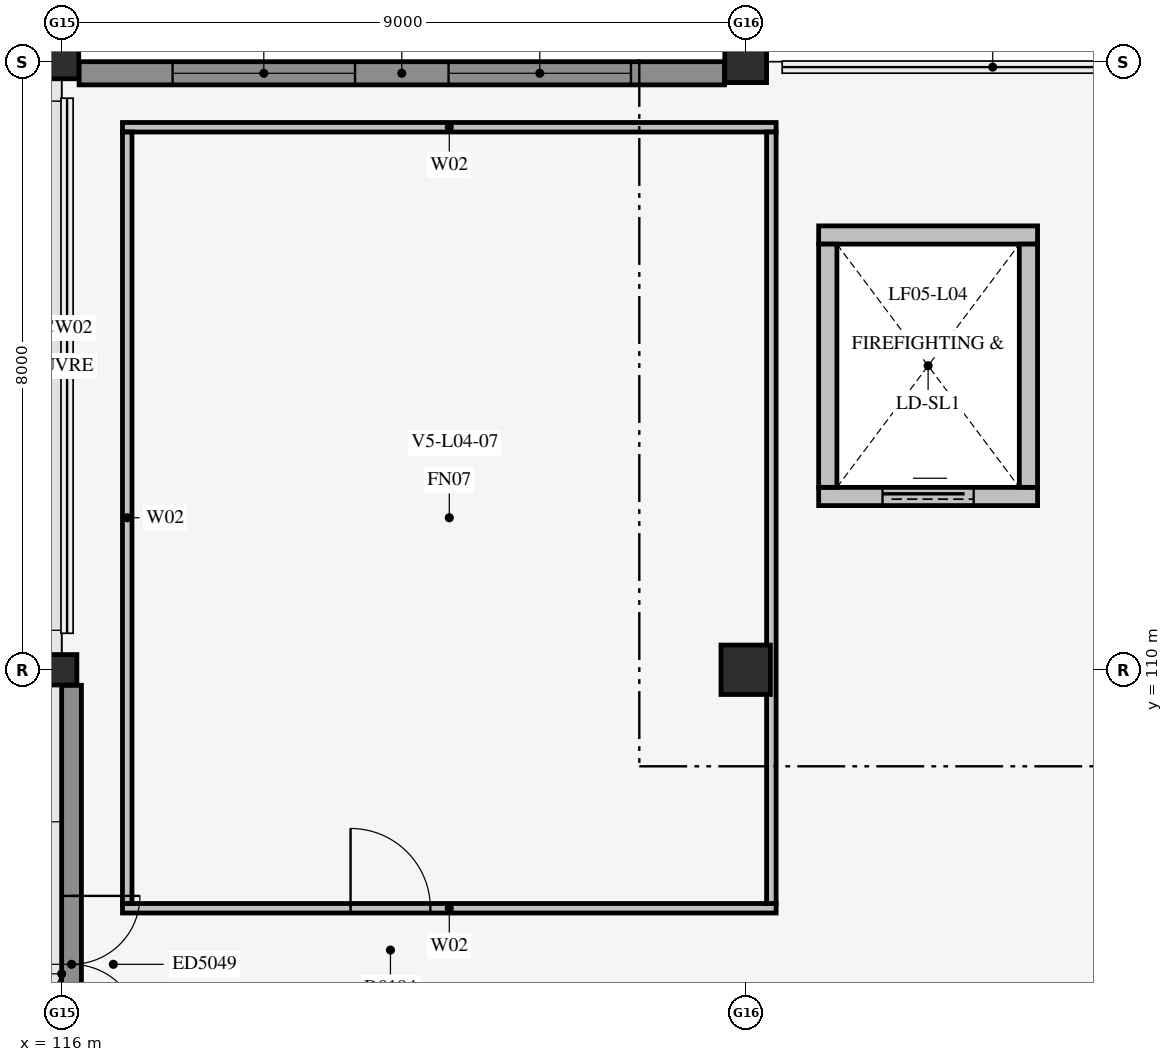
"""IFC4 building model, lengths in metres.
Left out: names, types, materials, properties, quantities, classifications, styles, units other than length and angle.
Written with IfcOpenShell. Run it as: python <this file> out.ifc"""

import sys

from ifc_helpers import new_model, si_unit, direction, frame, frame_2d, origin, origin_2d, place, context, subcontext, project, spatial, rectangle, extrude, element, fill, save


model = new_model("IFC4")
c1 = context("Model", 3, precision=1e-05, world=origin(), true_north=direction((0.0, 1.0)))
c2 = subcontext(c1, "Body", "Model", "MODEL_VIEW")
j1 = project(units=[si_unit("LENGTHUNIT", "METRE"), si_unit("PLANEANGLEUNIT", "RADIAN")], contexts=[c1])
p1 = place(None, origin())
s1 = spatial("IfcSite", under=j1, at=p1, CompositionType="ELEMENT")
p2 = place(p1, origin())
s2 = spatial("IfcBuilding", under=s1, at=p2, CompositionType="ELEMENT")
p3 = place(p2, frame((0.0, 0.0, 19.0)))
s3 = spatial("IfcBuildingStorey", under=s2, at=p3, CompositionType="ELEMENT", Elevation=19.0)
p4 = place(p3, frame((125.96, 112.28, 0.0), z_axis=(0.0, 0.0, 1.0), x_axis=(1.0, 0.0, 0.0)))
e1 = element("IfcWall", 1, at=p4, inside=s3, PredefinedType="SOLIDWALL", context=c2, shape_type="SweptSolid", body=[
    extrude(rectangle(XDim=2.88, YDim=0.24, at=frame_2d((1.44, 0.0))), origin(), (0.0, 0.0, 1.0), 3.45),
])
p5 = place(p4, frame((0.84, 0.0, 0.0)))
e2 = element("IfcOpeningElement", 2, at=p5, cuts=e1, PredefinedType="OPENING", context=c2, shape_type="SweptSolid", body=[
    extrude(rectangle(XDim=1.2, YDim=2.2, at=frame_2d((0.6, 1.1))), frame((0.0, 0.132, 0.0), z_axis=(0.0, -1.0, 0.0), x_axis=(1.0, 0.0, 0.0)), (0.0, 0.0, 1.0), 0.264),
])
p6 = place(p3, frame((125.96, 115.72, 0.0), z_axis=(0.0, 0.0, 1.0), x_axis=(1.0, 0.0, 0.0)))
e3 = element("IfcWall", 3, at=p6, inside=s3, PredefinedType="SOLIDWALL", context=c2, shape_type="SweptSolid", body=[
    extrude(rectangle(XDim=2.88, YDim=0.24, at=frame_2d((1.44, 0.0))), origin(), (0.0, 0.0, 1.0), 3.45),
])
for number, where, z_axis, x_axis in (
    (4, (126.08, 112.4, 0.0), (0.0, 0.0, 1.0), (0.0, 1.0, 0.0)),
    (5, (128.72, 112.4, 0.0), (0.0, 0.0, 1.0), (0.0, 1.0, 0.0)),
):
    element("IfcWall", number, at=place(p3, frame(where, z_axis=z_axis, x_axis=x_axis)), inside=s3, PredefinedType="SOLIDWALL", context=c2, shape_type="SweptSolid", body=[
        extrude(rectangle(XDim=3.2, YDim=0.24, at=frame_2d((1.6, 0.0))), origin(), (0.0, 0.0, 1.0), 3.45),
    ])
p7 = place(p3, frame((116.0, 110.0, 0.0), z_axis=(0.0, 0.0, 1.0), x_axis=(1.0, 0.0, 0.0)))
e6 = element("IfcColumn", 6, at=p7, inside=s3, PredefinedType="COLUMN", context=c2, shape_type="SweptSolid", body=[
    extrude(rectangle(XDim=0.4, YDim=0.4, at=origin_2d()), origin(), (0.0, 0.0, 1.0), 3.85),
])
p8 = place(p3, frame((116.0, 118.0, 0.0), z_axis=(0.0, 0.0, 1.0), x_axis=(1.0, 0.0, 0.0)))
e7 = element("IfcColumn", 7, at=p8, inside=s3, PredefinedType="COLUMN", context=c2, shape_type="SweptSolid", body=[
    extrude(rectangle(XDim=0.45, YDim=0.45, at=origin_2d()), origin(), (0.0, 0.0, 1.0), 3.85),
])
p9 = place(p3, frame((125.0, 110.0, 0.0), z_axis=(0.0, 0.0, 1.0), x_axis=(1.0, 0.0, 0.0)))
e8 = element("IfcColumn", 8, at=p9, inside=s3, PredefinedType="COLUMN", context=c2, shape_type="SweptSolid", body=[
    extrude(rectangle(XDim=0.65, YDim=0.65, at=origin_2d()), origin(), (0.0, 0.0, 1.0), 3.85),
])
p10 = place(p3, frame((125.0, 118.0, 0.0), z_axis=(0.0, 0.0, 1.0), x_axis=(1.0, 0.0, 0.0)))
e9 = element("IfcColumn", 9, at=p10, inside=s3, PredefinedType="COLUMN", context=c2, shape_type="SweptSolid", body=[
    extrude(rectangle(XDim=0.55, YDim=0.55, at=origin_2d()), origin(), (0.0, 0.0, 1.0), 3.85),
])
p11 = place(p3, frame((116.8, 106.863, 0.0), z_axis=(0.0, 0.0, 1.0), x_axis=(1.0, 0.0, 0.0)))
e10 = element("IfcWall", 10, at=p11, inside=s3, PredefinedType="PARTITIONING", context=c2, shape_type="SweptSolid", body=[
    extrude(rectangle(XDim=8.6, YDim=0.125, at=frame_2d((4.3, 0.0))), origin(), (0.0, 0.0, 1.0), 3.835),
])
p12 = place(p11, frame((3.001, 0.0, 0.0)))
e11 = element("IfcOpeningElement", 11, at=p12, cuts=e10, PredefinedType="OPENING", context=c2, shape_type="SweptSolid", body=[
    extrude(rectangle(XDim=1.05, YDim=2.15, at=frame_2d((0.525, 1.075))), frame((0.0, 0.074, 0.0), z_axis=(0.0, -1.0, 0.0), x_axis=(1.0, 0.0, 0.0)), (0.0, 0.0, 1.0), 0.149),
])
p13 = place(p3, frame((116.8, 117.137, 0.0), z_axis=(0.0, 0.0, 1.0), x_axis=(1.0, 0.0, 0.0)))
e12 = element("IfcWall", 12, at=p13, inside=s3, PredefinedType="PARTITIONING", context=c2, shape_type="SweptSolid", body=[
    extrude(rectangle(XDim=8.6, YDim=0.125, at=frame_2d((4.3, 0.0))), origin(), (0.0, 0.0, 1.0), 3.835),
])
for number, where, z_axis, x_axis in (
    (13, (125.337, 106.925, 0.0), (0.0, 0.0, 1.0), (0.0, 1.0, 0.0)),
    (14, (116.863, 106.925, 0.0), (0.0, 0.0, 1.0), (0.0, 1.0, 0.0)),
):
    element("IfcWall", number, at=place(p3, frame(where, z_axis=z_axis, x_axis=x_axis)), inside=s3, PredefinedType="PARTITIONING", context=c2, shape_type="SweptSolid", body=[
        extrude(rectangle(XDim=10.15, YDim=0.125, at=frame_2d((5.075, 0.0))), origin(), (0.0, 0.0, 1.0), 3.835),
    ])
p14 = place(p3, frame((116.229, 117.847, 0.0), z_axis=(0.0, 0.0, 1.0), x_axis=(1.0, 0.0, 0.0)))
e15 = element("IfcWall", 15, at=p14, inside=s3, PredefinedType="SOLIDWALL", context=c2, shape_type="SweptSolid", body=[
    extrude(rectangle(XDim=8.492, YDim=0.305, at=frame_2d((4.246, 0.0))), origin(), (0.0, 0.0, 1.0), 3.407),
])
p15 = place(p14, frame((1.231, 0.0, 0.95)))
e16 = element("IfcOpeningElement", 16, at=p15, cuts=e15, PredefinedType="OPENING", context=c2, shape_type="SweptSolid", body=[
    extrude(rectangle(XDim=2.4, YDim=1.2, at=frame_2d((1.2, 0.6))), frame((0.0, 0.165, 0.0), z_axis=(0.0, -1.0, 0.0), x_axis=(1.0, 0.0, 0.0)), (0.0, 0.0, 1.0), 0.329),
])
p16 = place(p14, frame((4.861, 0.0, 0.95)))
e17 = element("IfcOpeningElement", 17, at=p16, cuts=e15, PredefinedType="OPENING", context=c2, shape_type="SweptSolid", body=[
    extrude(rectangle(XDim=2.4, YDim=1.2, at=frame_2d((1.2, 0.6))), frame((0.0, 0.165, 0.0), z_axis=(0.0, -1.0, 0.0), x_axis=(1.0, 0.0, 0.0)), (0.0, 0.0, 1.0), 0.329),
])
p17 = place(p3, frame((116.13, 102.454, 0.0), z_axis=(0.0, 0.0, 1.0), x_axis=(0.0, 1.0, 0.0)))
e18 = element("IfcWall", 18, at=p17, inside=s3, PredefinedType="SOLIDWALL", context=c2, shape_type="SweptSolid", body=[
    extrude(rectangle(XDim=7.342, YDim=0.26, at=frame_2d((3.671, 0.0))), origin(), (0.0, 0.0, 1.0), 3.208),
])
p18 = place(p17, frame((2.771, 0.0, 0.0)))
e19 = element("IfcOpeningElement", 19, at=p18, cuts=e18, PredefinedType="OPENING", context=c2, shape_type="SweptSolid", body=[
    extrude(rectangle(XDim=1.8, YDim=2.4, at=frame_2d((0.9, 1.2))), frame((0.0, 0.142, 0.0), z_axis=(0.0, -1.0, 0.0), x_axis=(1.0, 0.0, 0.0)), (0.0, 0.0, 1.0), 0.284),
])
p19 = place(p12, origin())
e20 = element("IfcDoor", 20, at=p19, inside=s3, OperationType="SINGLE_SWING_LEFT", PredefinedType="DOOR", context=c2, shape_type="SweptSolid", body=[
    extrude(rectangle(XDim=1.05, YDim=2.15, at=frame_2d((0.525, 1.075))), frame((0.0, 0.025, 0.0), z_axis=(0.0, -1.0, 0.0), x_axis=(1.0, 0.0, 0.0)), (0.0, 0.0, 1.0), 0.05),
])
fill(e11, e20)
p20 = place(p15, origin())
e21 = element("IfcWindow", 21, at=p20, inside=s3, PartitioningType="SINGLE_PANEL", PredefinedType="WINDOW", context=c2, shape_type="SweptSolid", body=[
    extrude(rectangle(XDim=2.4, YDim=1.2, at=frame_2d((1.2, 0.6))), frame((0.0, 0.03, 0.0), z_axis=(0.0, -1.0, 0.0), x_axis=(1.0, 0.0, 0.0)), (0.0, 0.0, 1.0), 0.06),
])
fill(e16, e21)
p21 = place(p16, origin())
e22 = element("IfcWindow", 22, at=p21, inside=s3, PartitioningType="SINGLE_PANEL", PredefinedType="WINDOW", context=c2, shape_type="SweptSolid", body=[
    extrude(rectangle(XDim=2.4, YDim=1.2, at=frame_2d((1.2, 0.6))), frame((0.0, 0.03, 0.0), z_axis=(0.0, -1.0, 0.0), x_axis=(1.0, 0.0, 0.0)), (0.0, 0.0, 1.0), 0.06),
])
fill(e17, e22)
p22 = place(p18, origin())
e23 = element("IfcDoor", 23, at=p22, inside=s3, OperationType="DOUBLE_DOOR_SINGLE_SWING", PredefinedType="DOOR", context=c2, shape_type="SweptSolid", body=[
    extrude(rectangle(XDim=1.8, YDim=2.4, at=frame_2d((0.9, 1.2))), frame((0.0, 0.025, 0.0), z_axis=(0.0, -1.0, 0.0), x_axis=(1.0, 0.0, 0.0)), (0.0, 0.0, 1.0), 0.05),
])
fill(e19, e23)
p23 = place(p5, origin())
e24 = element("IfcDoor", 24, at=p23, inside=s3, OperationType="SLIDING_TO_LEFT", PredefinedType="USERDEFINED", context=c2, shape_type="SweptSolid", body=[
    extrude(rectangle(XDim=1.2, YDim=2.2, at=frame_2d((0.6, 1.1))), frame((0.0, 0.025, 0.0), z_axis=(0.0, -1.0, 0.0), x_axis=(1.0, 0.0, 0.0)), (0.0, 0.0, 1.0), 0.05),
])
fill(e2, e24)
save(model, sys.argv[1])
